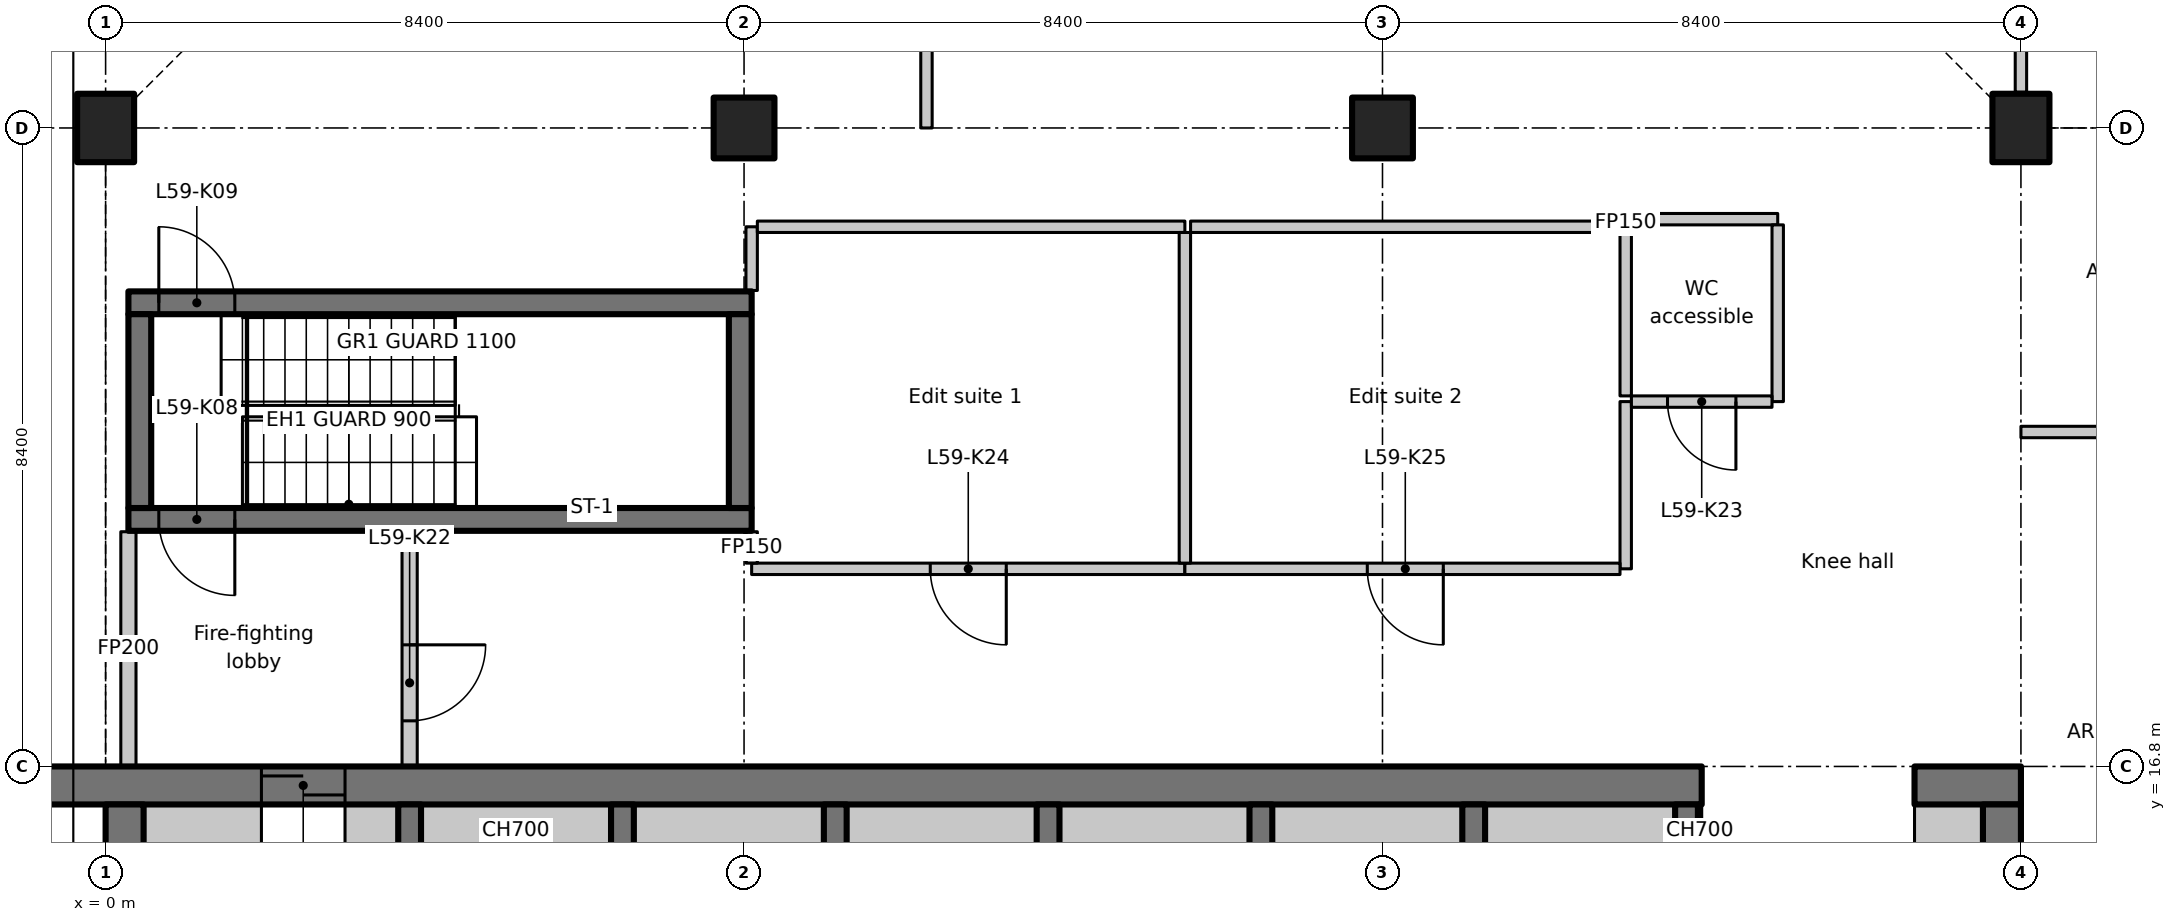
"""IFC4 building model, lengths in metres.
Left out: names, types, materials, properties, quantities, classifications, styles, units other than length and angle.
Written with IfcOpenShell. Run it as: python <this file> out.ifc"""

import sys

from ifc_helpers import new_model, si_unit, direction, frame, frame_2d, origin, origin_2d, place, context, subcontext, project, spatial, rectangle, extrude, element, fill, save


model = new_model("IFC4")
c1 = context("Model", 3, precision=1e-05, world=origin(), true_north=direction((0.0, 1.0)))
c2 = subcontext(c1, "Body", "Model", "MODEL_VIEW")
j1 = project(units=[si_unit("LENGTHUNIT", "METRE"), si_unit("PLANEANGLEUNIT", "RADIAN")], contexts=[c1])
p1 = place(None, origin())
s1 = spatial("IfcSite", under=j1, at=p1, CompositionType="ELEMENT")
p2 = place(p1, origin())
s2 = spatial("IfcBuilding", under=s1, at=p2, CompositionType="ELEMENT")
p3 = place(p2, frame((0.0, 0.0, 233.7)))
s3 = spatial("IfcBuildingStorey", under=s2, at=p3, CompositionType="ELEMENT", Elevation=233.7)
p4 = place(p3, frame((0.0, 25.2, 0.0), z_axis=(0.0, 0.0, 1.0), x_axis=(1.0, 0.0, 0.0)))
e1 = element("IfcColumn", 1, at=p4, inside=s3, PredefinedType="COLUMN", context=c2, shape_type="SweptSolid", body=[
    extrude(rectangle(XDim=0.75, YDim=0.9, at=origin_2d()), origin(), (0.0, 0.0, 1.0), 3.35),
])
for number, where, z_axis, x_axis in (
    (2, (8.4, 25.2, 0.0), (0.0, 0.0, 1.0), (1.0, 0.0, 0.0)),
    (3, (16.8, 25.2, 0.0), (0.0, 0.0, 1.0), (1.0, 0.0, 0.0)),
):
    element("IfcColumn", number, at=place(p3, frame(where, z_axis=z_axis, x_axis=x_axis)), inside=s3, PredefinedType="COLUMN", context=c2, shape_type="SweptSolid", body=[
        extrude(rectangle(XDim=0.8, YDim=0.8, at=origin_2d()), origin(), (0.0, 0.0, 1.0), 3.35),
    ])
p5 = place(p3, frame((25.2, 25.2, 0.0), z_axis=(0.0, 0.0, 1.0), x_axis=(1.0, 0.0, 0.0)))
e4 = element("IfcColumn", 4, at=p5, inside=s3, PredefinedType="COLUMN", context=c2, shape_type="SweptSolid", body=[
    extrude(rectangle(XDim=0.75, YDim=0.9, at=origin_2d()), origin(), (0.0, 0.0, 1.0), 3.35),
])
p6 = place(p3, frame((-1.1, 16.55, 0.0), z_axis=(0.0, 0.0, 1.0), x_axis=(1.0, 0.0, 0.0)))
e5 = element("IfcWall", 5, at=p6, inside=s3, PredefinedType="SHEAR", context=c2, shape_type="SweptSolid", body=[
    extrude(rectangle(XDim=22.1, YDim=0.5, at=frame_2d((11.05, 0.0))), origin(), (0.0, 0.0, 1.0), 3.35),
])
p7 = place(p6, frame((3.15, 0.0, 0.0)))
e6 = element("IfcOpeningElement", 6, at=p7, cuts=e5, PredefinedType="OPENING", context=c2, shape_type="SweptSolid", body=[
    extrude(rectangle(XDim=1.1, YDim=2.3, at=frame_2d((0.55, 1.15))), frame((0.0, 0.26, 0.0), z_axis=(0.0, -1.0, 0.0), x_axis=(1.0, 0.0, 0.0)), (0.0, 0.0, 1.0), 0.52),
])
p8 = place(p3, frame((23.8, 16.55, 0.0), z_axis=(0.0, 0.0, 1.0), x_axis=(1.0, 0.0, 0.0)))
e7 = element("IfcWall", 7, at=p8, inside=s3, PredefinedType="SHEAR", context=c2, shape_type="SweptSolid", body=[
    extrude(rectangle(XDim=1.4, YDim=0.5, at=frame_2d((0.7, 0.0))), origin(), (0.0, 0.0, 1.0), 3.35),
])
p9 = place(p3, frame((0.25, 7.436, 0.0), z_axis=(0.0, 0.0, 1.0), x_axis=(0.0, 1.0, 0.0)))
e8 = element("IfcWall", 8, at=p9, inside=s3, PredefinedType="SHEAR", context=c2, shape_type="SweptSolid", body=[
    extrude(rectangle(XDim=8.864, YDim=0.5, at=frame_2d((4.432, 0.0))), origin(), (0.0, 0.0, 1.0), 3.35),
])
p10 = place(p3, frame((24.95, 12.6, 0.0), z_axis=(0.0, 0.0, 1.0), x_axis=(0.0, 1.0, 0.0)))
e9 = element("IfcWall", 9, at=p10, inside=s3, PredefinedType="SHEAR", context=c2, shape_type="SweptSolid", body=[
    extrude(rectangle(XDim=3.7, YDim=0.5, at=frame_2d((1.85, 0.0))), origin(), (0.0, 0.0, 1.0), 3.35),
])
p11 = place(p3, frame((0.5, 15.95, 0.0), z_axis=(0.0, 0.0, 1.0), x_axis=(1.0, 0.0, 0.0)))
e10 = element("IfcWall", 10, at=p11, inside=s3, PredefinedType="PARTITIONING", context=c2, shape_type="SweptSolid", body=[
    extrude(rectangle(XDim=1.55, YDim=0.7, at=frame_2d((0.775, 0.0))), origin(), (0.0, 0.0, 1.0), 3.35),
])
p12 = place(p3, frame((23.8, 15.95, 0.0), z_axis=(0.0, 0.0, 1.0), x_axis=(1.0, 0.0, 0.0)))
e11 = element("IfcWall", 11, at=p12, inside=s3, PredefinedType="PARTITIONING", context=c2, shape_type="SweptSolid", body=[
    extrude(rectangle(XDim=0.9, YDim=0.7, at=frame_2d((0.45, 0.0))), origin(), (0.0, 0.0, 1.0), 3.35),
])
for number, where, z_axis, x_axis in (
    (12, (4.0, 12.95, 0.0), (0.0, 0.0, 1.0), (0.0, 1.0, 0.0)),
    (13, (6.8, 12.95, 0.0), (0.0, 0.0, 1.0), (0.0, 1.0, 0.0)),
    (14, (9.6, 12.95, 0.0), (0.0, 0.0, 1.0), (0.0, 1.0, 0.0)),
    (15, (12.4, 12.95, 0.0), (0.0, 0.0, 1.0), (0.0, 1.0, 0.0)),
    (16, (15.2, 12.95, 0.0), (0.0, 0.0, 1.0), (0.0, 1.0, 0.0)),
    (17, (18.0, 12.95, 0.0), (0.0, 0.0, 1.0), (0.0, 1.0, 0.0)),
    (18, (20.8, 12.95, 0.0), (0.0, 0.0, 1.0), (0.0, 1.0, 0.0)),
):
    element("IfcWall", number, at=place(p3, frame(where, z_axis=z_axis, x_axis=x_axis)), inside=s3, PredefinedType="SHEAR", context=c2, shape_type="SweptSolid", body=[
        extrude(rectangle(XDim=3.35, YDim=0.3, at=frame_2d((1.675, 0.0))), origin(), (0.0, 0.0, 1.0), 3.35),
    ])
p13 = place(p3, frame((8.5, 20.05, 0.0), z_axis=(0.0, 0.0, 1.0), x_axis=(-1.0, 0.0, 0.0)))
e19 = element("IfcWall", 19, at=p13, inside=s3, PredefinedType="SHEAR", context=c2, shape_type="SweptSolid", body=[
    extrude(rectangle(XDim=8.2, YDim=0.3, at=frame_2d((4.1, 0.0))), origin(), (0.0, 0.0, 1.0), 3.35),
])
p14 = place(p13, frame((6.8, 0.0, 0.0)))
e20 = element("IfcOpeningElement", 20, at=p14, cuts=e19, PredefinedType="OPENING", context=c2, shape_type="SweptSolid", body=[
    extrude(rectangle(XDim=1.0, YDim=2.1, at=frame_2d((0.5, 1.05))), frame((0.0, 0.16, 0.0), z_axis=(0.0, -1.0, 0.0), x_axis=(1.0, 0.0, 0.0)), (0.0, 0.0, 1.0), 0.32),
])
p15 = place(p3, frame((0.3, 22.9, 0.0), z_axis=(0.0, 0.0, 1.0), x_axis=(1.0, 0.0, 0.0)))
e21 = element("IfcWall", 21, at=p15, inside=s3, PredefinedType="SHEAR", context=c2, shape_type="SweptSolid", body=[
    extrude(rectangle(XDim=8.2, YDim=0.3, at=frame_2d((4.1, 0.0))), origin(), (0.0, 0.0, 1.0), 3.35),
])
p16 = place(p15, frame((0.4, 0.0, 0.0)))
e22 = element("IfcOpeningElement", 22, at=p16, cuts=e21, PredefinedType="OPENING", context=c2, shape_type="SweptSolid", body=[
    extrude(rectangle(XDim=1.0, YDim=2.1, at=frame_2d((0.5, 1.05))), frame((0.0, 0.16, 0.0), z_axis=(0.0, -1.0, 0.0), x_axis=(1.0, 0.0, 0.0)), (0.0, 0.0, 1.0), 0.32),
])
for number, where, z_axis, x_axis in (
    (23, (0.45, 20.2, 0.0), (0.0, 0.0, 1.0), (0.0, 1.0, 0.0)),
    (24, (8.35, 20.2, 0.0), (0.0, 0.0, 1.0), (0.0, 1.0, 0.0)),
):
    element("IfcWall", number, at=place(p3, frame(where, z_axis=z_axis, x_axis=x_axis)), inside=s3, PredefinedType="SHEAR", context=c2, shape_type="SweptSolid", body=[
        extrude(rectangle(XDim=2.55, YDim=0.3, at=frame_2d((1.275, 0.0))), origin(), (0.0, 0.0, 1.0), 3.35),
    ])
p17 = place(p3, frame((0.3, 16.812, 0.0), z_axis=(0.0, 0.0, 1.0), x_axis=(0.0, 1.0, 0.0)))
e25 = element("IfcWall", 25, at=p17, inside=s3, PredefinedType="PARTITIONING", context=c2, shape_type="SweptSolid", body=[
    extrude(rectangle(XDim=3.076, YDim=0.2, at=frame_2d((1.538, 0.0))), origin(), (0.0, 0.0, 1.0), 2.98),
])
p18 = place(p3, frame((4.0, 19.888, 0.0), z_axis=(0.0, 0.0, 1.0), x_axis=(0.0, -1.0, 0.0)))
e26 = element("IfcWall", 26, at=p18, inside=s3, PredefinedType="PARTITIONING", context=c2, shape_type="SweptSolid", body=[
    extrude(rectangle(XDim=3.076, YDim=0.2, at=frame_2d((1.538, 0.0))), origin(), (0.0, 0.0, 1.0), 3.35),
])
p19 = place(p18, frame((1.488, 0.0, 0.0)))
e27 = element("IfcOpeningElement", 27, at=p19, cuts=e26, PredefinedType="OPENING", context=c2, shape_type="SweptSolid", body=[
    extrude(rectangle(XDim=1.0, YDim=2.1, at=frame_2d((0.5, 1.05))), frame((0.0, 0.11, 0.0), z_axis=(0.0, -1.0, 0.0), x_axis=(1.0, 0.0, 0.0)), (0.0, 0.0, 1.0), 0.22),
])
p20 = place(p3, frame((14.2, 19.4, 0.0), z_axis=(0.0, 0.0, 1.0), x_axis=(-1.0, 0.0, 0.0)))
e28 = element("IfcWall", 28, at=p20, inside=s3, PredefinedType="PARTITIONING", context=c2, shape_type="SweptSolid", body=[
    extrude(rectangle(XDim=5.7, YDim=0.15, at=frame_2d((2.85, 0.0))), origin(), (0.0, 0.0, 1.0), 3.35),
])
p21 = place(p20, frame((2.35, 0.0, 0.0)))
e29 = element("IfcOpeningElement", 29, at=p21, cuts=e28, PredefinedType="OPENING", context=c2, shape_type="SweptSolid", body=[
    extrude(rectangle(XDim=1.0, YDim=2.1, at=frame_2d((0.5, 1.05))), frame((0.0, 0.085, 0.0), z_axis=(0.0, -1.0, 0.0), x_axis=(1.0, 0.0, 0.0)), (0.0, 0.0, 1.0), 0.17),
])
p22 = place(p3, frame((8.5, 19.475, 0.0), z_axis=(0.0, 0.0, 1.0), x_axis=(0.0, 1.0, 0.0)))
e30 = element("IfcWall", 30, at=p22, inside=s3, PredefinedType="PARTITIONING", context=c2, shape_type="SweptSolid", body=[
    extrude(rectangle(XDim=0.413, YDim=0.15, at=frame_2d((0.207, 0.0))), origin(), (0.0, 0.0, 1.0), 3.35),
])
p23 = place(p3, frame((8.5, 23.062, 0.0), z_axis=(0.0, 0.0, 1.0), x_axis=(0.0, 1.0, 0.0)))
e31 = element("IfcWall", 31, at=p23, inside=s3, PredefinedType="PARTITIONING", context=c2, shape_type="SweptSolid", body=[
    extrude(rectangle(XDim=0.838, YDim=0.15, at=frame_2d((0.419, 0.0))), origin(), (0.0, 0.0, 1.0), 3.35),
])
p24 = place(p3, frame((8.575, 23.9, 0.0), z_axis=(0.0, 0.0, 1.0), x_axis=(1.0, 0.0, 0.0)))
e32 = element("IfcWall", 32, at=p24, inside=s3, PredefinedType="PARTITIONING", context=c2, shape_type="SweptSolid", body=[
    extrude(rectangle(XDim=5.625, YDim=0.15, at=frame_2d((2.812, 0.0))), origin(), (0.0, 0.0, 1.0), 3.35),
])
p25 = place(p3, frame((20.0, 21.6, 0.0), z_axis=(0.0, 0.0, 1.0), x_axis=(0.0, -1.0, 0.0)))
e33 = element("IfcWall", 33, at=p25, inside=s3, PredefinedType="PARTITIONING", context=c2, shape_type="SweptSolid", body=[
    extrude(rectangle(XDim=2.2, YDim=0.15, at=frame_2d((1.1, 0.0))), origin(), (0.0, 0.0, 1.0), 3.35),
])
p26 = place(p3, frame((19.925, 19.4, 0.0), z_axis=(0.0, 0.0, 1.0), x_axis=(-1.0, 0.0, 0.0)))
e34 = element("IfcWall", 34, at=p26, inside=s3, PredefinedType="PARTITIONING", context=c2, shape_type="SweptSolid", body=[
    extrude(rectangle(XDim=5.725, YDim=0.15, at=frame_2d((2.863, 0.0))), origin(), (0.0, 0.0, 1.0), 3.35),
])
p27 = place(p26, frame((2.325, 0.0, 0.0)))
e35 = element("IfcOpeningElement", 35, at=p27, cuts=e34, PredefinedType="OPENING", context=c2, shape_type="SweptSolid", body=[
    extrude(rectangle(XDim=1.0, YDim=2.1, at=frame_2d((0.5, 1.05))), frame((0.0, 0.085, 0.0), z_axis=(0.0, -1.0, 0.0), x_axis=(1.0, 0.0, 0.0)), (0.0, 0.0, 1.0), 0.17),
])
p28 = place(p3, frame((14.2, 23.825, 0.0), z_axis=(0.0, 0.0, 1.0), x_axis=(0.0, -1.0, 0.0)))
e36 = element("IfcWall", 36, at=p28, inside=s3, PredefinedType="PARTITIONING", context=c2, shape_type="SweptSolid", body=[
    extrude(rectangle(XDim=4.35, YDim=0.15, at=frame_2d((2.175, 0.0))), origin(), (0.0, 0.0, 1.0), 3.35),
])
p29 = place(p3, frame((14.275, 23.9, 0.0), z_axis=(0.0, 0.0, 1.0), x_axis=(1.0, 0.0, 0.0)))
e37 = element("IfcWall", 37, at=p29, inside=s3, PredefinedType="PARTITIONING", context=c2, shape_type="SweptSolid", body=[
    extrude(rectangle(XDim=5.725, YDim=0.15, at=frame_2d((2.863, 0.0))), origin(), (0.0, 0.0, 1.0), 3.35),
])
p30 = place(p3, frame((20.0, 23.9, 0.0), z_axis=(0.0, 0.0, 1.0), x_axis=(0.0, 1.0, 0.0)))
e38 = element("IfcWall", 38, at=p30, inside=s3, PredefinedType="PARTITIONING", context=c2, shape_type="SweptSolid", body=[
    extrude(rectangle(XDim=0.1, YDim=0.15, at=frame_2d((0.05, 0.0))), origin(), (0.0, 0.0, 1.0), 3.35),
])
p31 = place(p3, frame((20.075, 24.0, 0.0), z_axis=(0.0, 0.0, 1.0), x_axis=(1.0, 0.0, 0.0)))
e39 = element("IfcWall", 39, at=p31, inside=s3, PredefinedType="PARTITIONING", context=c2, shape_type="SweptSolid", body=[
    extrude(rectangle(XDim=1.925, YDim=0.15, at=frame_2d((0.962, 0.0))), origin(), (0.0, 0.0, 1.0), 3.35),
])
p32 = place(p3, frame((22.0, 23.925, 0.0), z_axis=(0.0, 0.0, 1.0), x_axis=(0.0, -1.0, 0.0)))
e40 = element("IfcWall", 40, at=p32, inside=s3, PredefinedType="PARTITIONING", context=c2, shape_type="SweptSolid", body=[
    extrude(rectangle(XDim=2.325, YDim=0.15, at=frame_2d((1.163, 0.0))), origin(), (0.0, 0.0, 1.0), 3.35),
])
p33 = place(p3, frame((21.925, 21.6, 0.0), z_axis=(0.0, 0.0, 1.0), x_axis=(-1.0, 0.0, 0.0)))
e41 = element("IfcWall", 41, at=p33, inside=s3, PredefinedType="PARTITIONING", context=c2, shape_type="SweptSolid", body=[
    extrude(rectangle(XDim=1.85, YDim=0.15, at=frame_2d((0.925, 0.0))), origin(), (0.0, 0.0, 1.0), 3.35),
])
p34 = place(p33, frame((0.475, 0.0, 0.0)))
e42 = element("IfcOpeningElement", 42, at=p34, cuts=e41, PredefinedType="OPENING", context=c2, shape_type="SweptSolid", body=[
    extrude(rectangle(XDim=0.9, YDim=2.1, at=frame_2d((0.45, 1.05))), frame((0.0, 0.085, 0.0), z_axis=(0.0, -1.0, 0.0), x_axis=(1.0, 0.0, 0.0)), (0.0, 0.0, 1.0), 0.17),
])
p35 = place(p3, frame((20.0, 21.675, 0.0), z_axis=(0.0, 0.0, 1.0), x_axis=(0.0, 1.0, 0.0)))
e43 = element("IfcWall", 43, at=p35, inside=s3, PredefinedType="PARTITIONING", context=c2, shape_type="SweptSolid", body=[
    extrude(rectangle(XDim=2.15, YDim=0.15, at=frame_2d((1.075, 0.0))), origin(), (0.0, 0.0, 1.0), 3.35),
])
p36 = place(p3, frame((3.15, 15.95, 0.0), z_axis=(0.0, 0.0, 1.0), x_axis=(1.0, 0.0, 0.0)))
e44 = element("IfcWall", 44, at=p36, inside=s3, PredefinedType="PARTITIONING", context=c2, shape_type="SweptSolid", body=[
    extrude(rectangle(XDim=0.7, YDim=0.7, at=frame_2d((0.35, 0.0))), origin(), (0.0, 0.0, 1.0), 3.35),
])
for number, where, z_axis, x_axis in (
    (45, (4.15, 15.95, 0.0), (0.0, 0.0, 1.0), (1.0, 0.0, 0.0)),
    (46, (6.95, 15.95, 0.0), (0.0, 0.0, 1.0), (1.0, 0.0, 0.0)),
    (47, (9.75, 15.95, 0.0), (0.0, 0.0, 1.0), (1.0, 0.0, 0.0)),
    (48, (12.55, 15.95, 0.0), (0.0, 0.0, 1.0), (1.0, 0.0, 0.0)),
    (49, (15.35, 15.95, 0.0), (0.0, 0.0, 1.0), (1.0, 0.0, 0.0)),
    (50, (18.15, 15.95, 0.0), (0.0, 0.0, 1.0), (1.0, 0.0, 0.0)),
):
    element("IfcWall", number, at=place(p3, frame(where, z_axis=z_axis, x_axis=x_axis)), inside=s3, PredefinedType="PARTITIONING", context=c2, shape_type="SweptSolid", body=[
        extrude(rectangle(XDim=2.5, YDim=0.7, at=frame_2d((1.25, 0.0))), origin(), (0.0, 0.0, 1.0), 3.35),
    ])
p37 = place(p3, frame((20.95, 15.95, 0.0), z_axis=(0.0, 0.0, 1.0), x_axis=(1.0, 0.0, 0.0)))
e51 = element("IfcWall", 51, at=p37, inside=s3, PredefinedType="PARTITIONING", context=c2, shape_type="SweptSolid", body=[
    extrude(rectangle(XDim=0.05, YDim=0.7, at=frame_2d((0.025, 0.0))), origin(), (0.0, 0.0, 1.0), 3.35),
])
p38 = place(p3, frame((25.2, 21.2, 0.0), z_axis=(0.0, 0.0, 1.0), x_axis=(1.0, 0.0, 0.0)))
e52 = element("IfcWall", 52, at=p38, inside=s3, PredefinedType="PARTITIONING", context=c2, shape_type="SweptSolid", body=[
    extrude(rectangle(XDim=4.2, YDim=0.15, at=frame_2d((2.1, 0.0))), origin(), (0.0, 0.0, 1.0), 3.33),
])
p39 = place(p38, frame((1.5, 0.0, 0.0)))
e53 = element("IfcOpeningElement", 53, at=p39, cuts=e52, PredefinedType="OPENING", context=c2, shape_type="SweptSolid", body=[
    extrude(rectangle(XDim=1.0, YDim=2.1, at=frame_2d((0.5, 1.05))), frame((0.0, 0.085, 0.0), z_axis=(0.0, -1.0, 0.0), x_axis=(1.0, 0.0, 0.0)), (0.0, 0.0, 1.0), 0.17),
])
p40 = place(p3, frame((25.2, 25.67, 0.0), z_axis=(0.0, 0.0, 1.0), x_axis=(0.0, 1.0, 0.0)))
e54 = element("IfcWall", 54, at=p40, inside=s3, PredefinedType="PARTITIONING", context=c2, shape_type="SweptSolid", body=[
    extrude(rectangle(XDim=4.487, YDim=0.15, at=frame_2d((2.243, 0.0))), origin(), (0.0, 0.0, 1.0), 2.98),
])
p41 = place(p3, frame((10.8, 25.2, 0.0), z_axis=(0.0, 0.0, 1.0), x_axis=(0.0, 1.0, 0.0)))
e55 = element("IfcWall", 55, at=p41, inside=s3, PredefinedType="PARTITIONING", context=c2, shape_type="SweptSolid", body=[
    extrude(rectangle(XDim=4.2, YDim=0.15, at=frame_2d((2.1, 0.0))), origin(), (0.0, 0.0, 1.0), 3.33),
])
p42 = place(p41, frame((1.5, 0.0, 0.0)))
e56 = element("IfcOpeningElement", 56, at=p42, cuts=e55, PredefinedType="OPENING", context=c2, shape_type="SweptSolid", body=[
    extrude(rectangle(XDim=1.1, YDim=2.1, at=frame_2d((0.55, 1.05))), frame((0.0, 0.085, 0.0), z_axis=(0.0, -1.0, 0.0), x_axis=(1.0, 0.0, 0.0)), (0.0, 0.0, 1.0), 0.17),
])
p43 = place(p7, origin())
e57 = element("IfcDoor", 57, at=p43, inside=s3, OperationType="SLIDING_TO_LEFT", PredefinedType="DOOR", context=c2, shape_type="SweptSolid", body=[
    extrude(rectangle(XDim=1.1, YDim=2.3, at=frame_2d((0.55, 1.15))), frame((0.0, 0.025, 0.0), z_axis=(0.0, -1.0, 0.0), x_axis=(1.0, 0.0, 0.0)), (0.0, 0.0, 1.0), 0.05),
])
fill(e6, e57)
p44 = place(p14, origin())
e58 = element("IfcDoor", 58, at=p44, inside=s3, OperationType="SINGLE_SWING_LEFT", PredefinedType="DOOR", context=c2, shape_type="SweptSolid", body=[
    extrude(rectangle(XDim=1.0, YDim=2.1, at=frame_2d((0.5, 1.05))), frame((0.0, 0.025, 0.0), z_axis=(0.0, -1.0, 0.0), x_axis=(1.0, 0.0, 0.0)), (0.0, 0.0, 1.0), 0.05),
])
fill(e20, e58)
p45 = place(p16, origin())
e59 = element("IfcDoor", 59, at=p45, inside=s3, OperationType="SINGLE_SWING_RIGHT", PredefinedType="DOOR", context=c2, shape_type="SweptSolid", body=[
    extrude(rectangle(XDim=1.0, YDim=2.1, at=frame_2d((0.5, 1.05))), frame((0.0, 0.025, 0.0), z_axis=(0.0, -1.0, 0.0), x_axis=(1.0, 0.0, 0.0)), (0.0, 0.0, 1.0), 0.05),
])
fill(e22, e59)
p46 = place(p19, origin())
e60 = element("IfcDoor", 60, at=p46, inside=s3, OperationType="SINGLE_SWING_LEFT", PredefinedType="DOOR", context=c2, shape_type="SweptSolid", body=[
    extrude(rectangle(XDim=1.0, YDim=2.1, at=frame_2d((0.5, 1.05))), frame((0.0, 0.025, 0.0), z_axis=(0.0, -1.0, 0.0), x_axis=(1.0, 0.0, 0.0)), (0.0, 0.0, 1.0), 0.05),
])
fill(e27, e60)
p47 = place(p34, origin())
e61 = element("IfcDoor", 61, at=p47, inside=s3, OperationType="SINGLE_SWING_RIGHT", PredefinedType="DOOR", context=c2, shape_type="SweptSolid", body=[
    extrude(rectangle(XDim=0.9, YDim=2.1, at=frame_2d((0.45, 1.05))), frame((0.0, 0.025, 0.0), z_axis=(0.0, -1.0, 0.0), x_axis=(1.0, 0.0, 0.0)), (0.0, 0.0, 1.0), 0.05),
])
fill(e42, e61)
p48 = place(p21, origin())
e62 = element("IfcDoor", 62, at=p48, inside=s3, OperationType="SINGLE_SWING_LEFT", PredefinedType="DOOR", context=c2, shape_type="SweptSolid", body=[
    extrude(rectangle(XDim=1.0, YDim=2.1, at=frame_2d((0.5, 1.05))), frame((0.0, 0.025, 0.0), z_axis=(0.0, -1.0, 0.0), x_axis=(1.0, 0.0, 0.0)), (0.0, 0.0, 1.0), 0.05),
])
fill(e29, e62)
p49 = place(p27, origin())
e63 = element("IfcDoor", 63, at=p49, inside=s3, OperationType="SINGLE_SWING_RIGHT", PredefinedType="DOOR", context=c2, shape_type="SweptSolid", body=[
    extrude(rectangle(XDim=1.0, YDim=2.1, at=frame_2d((0.5, 1.05))), frame((0.0, 0.025, 0.0), z_axis=(0.0, -1.0, 0.0), x_axis=(1.0, 0.0, 0.0)), (0.0, 0.0, 1.0), 0.05),
])
fill(e35, e63)
save(model, sys.argv[1])
